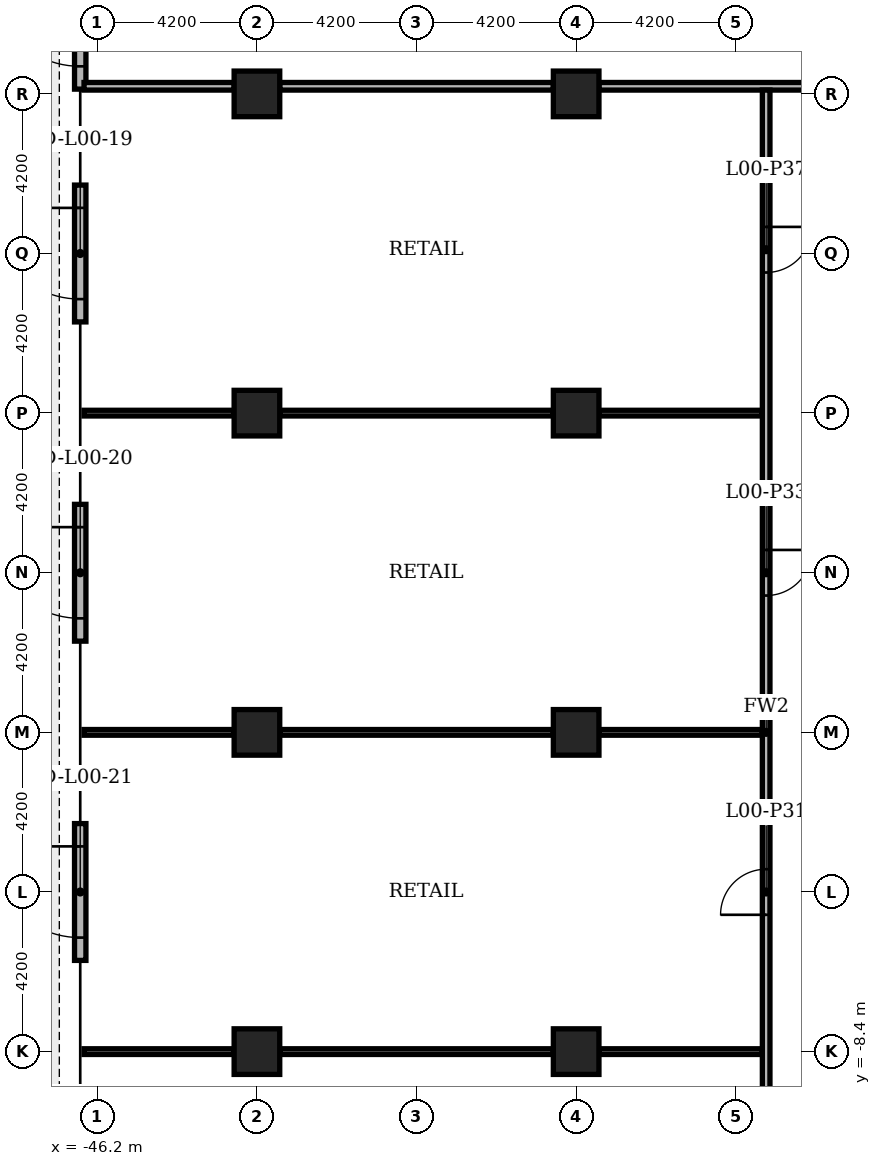
"""IFC4 building model, lengths in metres.
Left out: names, types, materials, properties, quantities, classifications, styles, units other than length and angle.
Written with IfcOpenShell. Run it as: python <this file> out.ifc"""

import sys

from ifc_helpers import new_model, si_unit, direction, frame, frame_2d, origin, origin_2d, place, context, subcontext, project, spatial, rectangle, extrude, element, fill, save


model = new_model("IFC4")
c1 = context("Model", 3, precision=1e-05, world=origin(), true_north=direction((0.0, 1.0)))
c2 = subcontext(c1, "Body", "Model", "MODEL_VIEW")
j1 = project(units=[si_unit("LENGTHUNIT", "METRE"), si_unit("PLANEANGLEUNIT", "RADIAN")], contexts=[c1])
p1 = place(None, origin())
s1 = spatial("IfcSite", under=j1, at=p1, CompositionType="ELEMENT")
p2 = place(p1, origin())
s2 = spatial("IfcBuilding", under=s1, at=p2, CompositionType="ELEMENT")
p3 = place(p2, origin())
s3 = spatial("IfcBuildingStorey", under=s2, at=p3, CompositionType="ELEMENT", Elevation=0.0)
for number, where, z_axis, x_axis in (
    (1, (-33.6, 0.0, 0.0), (0.0, 0.0, 1.0), (1.0, 0.0, 0.0)),
    (2, (-33.6, 8.4, 0.0), (0.0, 0.0, 1.0), (1.0, 0.0, 0.0)),
    (3, (-33.6, 16.8, 0.0), (0.0, 0.0, 1.0), (1.0, 0.0, 0.0)),
    (4, (-33.6, -8.4, 0.0), (0.0, 0.0, 1.0), (1.0, 0.0, 0.0)),
    (5, (-42.0, 0.0, 0.0), (0.0, 0.0, 1.0), (1.0, 0.0, 0.0)),
    (6, (-42.0, 8.4, 0.0), (0.0, 0.0, 1.0), (1.0, 0.0, 0.0)),
    (7, (-42.0, 16.8, 0.0), (0.0, 0.0, 1.0), (1.0, 0.0, 0.0)),
    (8, (-42.0, -8.4, 0.0), (0.0, 0.0, 1.0), (1.0, 0.0, 0.0)),
):
    element("IfcColumn", number, at=place(p3, frame(where, z_axis=z_axis, x_axis=x_axis)), inside=s3, PredefinedType="COLUMN", context=c2, shape_type="SweptSolid", body=[
        extrude(rectangle(XDim=1.2, YDim=1.2, at=origin_2d()), origin(), (0.0, 0.0, 1.0), 7.2),
    ])
p4 = place(p3, frame((-46.65, 20.525, 0.0), z_axis=(0.0, 0.0, 1.0), x_axis=(0.0, -1.0, 0.0)))
e9 = element("IfcWall", 9, at=p4, inside=s3, PredefinedType="STANDARD", context=c2, shape_type="SweptSolid", body=[
    extrude(rectangle(XDim=3.6, YDim=0.3, at=frame_2d((1.8, 0.0))), origin(), (0.0, 0.0, 1.0), 6.78),
])
p5 = place(p4, frame((0.6, 0.0, 0.0)))
e10 = element("IfcOpeningElement", 10, at=p5, cuts=e9, PredefinedType="OPENING", context=c2, shape_type="SweptSolid", body=[
    extrude(rectangle(XDim=2.4, YDim=2.4, at=frame_2d((1.2, 1.2))), frame((0.0, 0.16, 0.0), z_axis=(0.0, -1.0, 0.0), x_axis=(1.0, 0.0, 0.0)), (0.0, 0.0, 1.0), 0.32),
])
p6 = place(p3, frame((-46.65, 14.4, 0.0), z_axis=(0.0, 0.0, 1.0), x_axis=(0.0, -1.0, 0.0)))
e11 = element("IfcWall", 11, at=p6, inside=s3, PredefinedType="STANDARD", context=c2, shape_type="SweptSolid", body=[
    extrude(rectangle(XDim=3.6, YDim=0.3, at=frame_2d((1.8, 0.0))), origin(), (0.0, 0.0, 1.0), 6.78),
])
p7 = place(p6, frame((0.6, 0.0, 0.0)))
e12 = element("IfcOpeningElement", 12, at=p7, cuts=e11, PredefinedType="OPENING", context=c2, shape_type="SweptSolid", body=[
    extrude(rectangle(XDim=2.4, YDim=2.4, at=frame_2d((1.2, 1.2))), frame((0.0, 0.16, 0.0), z_axis=(0.0, -1.0, 0.0), x_axis=(1.0, 0.0, 0.0)), (0.0, 0.0, 1.0), 0.32),
])
p8 = place(p3, frame((-46.65, 6.0, 0.0), z_axis=(0.0, 0.0, 1.0), x_axis=(0.0, -1.0, 0.0)))
e13 = element("IfcWall", 13, at=p8, inside=s3, PredefinedType="STANDARD", context=c2, shape_type="SweptSolid", body=[
    extrude(rectangle(XDim=3.6, YDim=0.3, at=frame_2d((1.8, 0.0))), origin(), (0.0, 0.0, 1.0), 6.78),
])
p9 = place(p8, frame((0.6, 0.0, 0.0)))
e14 = element("IfcOpeningElement", 14, at=p9, cuts=e13, PredefinedType="OPENING", context=c2, shape_type="SweptSolid", body=[
    extrude(rectangle(XDim=2.4, YDim=2.4, at=frame_2d((1.2, 1.2))), frame((0.0, 0.16, 0.0), z_axis=(0.0, -1.0, 0.0), x_axis=(1.0, 0.0, 0.0)), (0.0, 0.0, 1.0), 0.32),
])
p10 = place(p3, frame((-46.65, -2.4, 0.0), z_axis=(0.0, 0.0, 1.0), x_axis=(0.0, -1.0, 0.0)))
e15 = element("IfcWall", 15, at=p10, inside=s3, PredefinedType="STANDARD", context=c2, shape_type="SweptSolid", body=[
    extrude(rectangle(XDim=3.6, YDim=0.3, at=frame_2d((1.8, 0.0))), origin(), (0.0, 0.0, 1.0), 6.78),
])
p11 = place(p10, frame((0.6, 0.0, 0.0)))
e16 = element("IfcOpeningElement", 16, at=p11, cuts=e15, PredefinedType="OPENING", context=c2, shape_type="SweptSolid", body=[
    extrude(rectangle(XDim=2.4, YDim=2.4, at=frame_2d((1.2, 1.2))), frame((0.0, 0.16, 0.0), z_axis=(0.0, -1.0, 0.0), x_axis=(1.0, 0.0, 0.0)), (0.0, 0.0, 1.0), 0.32),
])
p12 = place(p3, frame((-46.55, -8.4, 0.0), z_axis=(0.0, 0.0, 1.0), x_axis=(1.0, 0.0, 0.0)))
e17 = element("IfcWall", 17, at=p12, inside=s3, PredefinedType="PARTITIONING", context=c2, shape_type="SweptSolid", body=[
    extrude(rectangle(XDim=3.95, YDim=0.15, at=frame_2d((1.975, 0.0))), origin(), (0.0, 0.0, 1.0), 6.48),
])
p13 = place(p3, frame((-41.4, -8.4, 0.0), z_axis=(0.0, 0.0, 1.0), x_axis=(1.0, 0.0, 0.0)))
e18 = element("IfcWall", 18, at=p13, inside=s3, PredefinedType="PARTITIONING", context=c2, shape_type="SweptSolid", body=[
    extrude(rectangle(XDim=7.2, YDim=0.15, at=frame_2d((3.6, 0.0))), origin(), (0.0, 0.0, 1.0), 6.48),
])
p14 = place(p3, frame((-33.0, -8.4, 0.0), z_axis=(0.0, 0.0, 1.0), x_axis=(1.0, 0.0, 0.0)))
e19 = element("IfcWall", 19, at=p14, inside=s3, PredefinedType="PARTITIONING", context=c2, shape_type="SweptSolid", body=[
    extrude(rectangle(XDim=4.3, YDim=0.15, at=frame_2d((2.15, 0.0))), origin(), (0.0, 0.0, 1.0), 6.48),
])
p15 = place(p3, frame((-46.55, 0.0, 0.0), z_axis=(0.0, 0.0, 1.0), x_axis=(1.0, 0.0, 0.0)))
e20 = element("IfcWall", 20, at=p15, inside=s3, PredefinedType="PARTITIONING", context=c2, shape_type="SweptSolid", body=[
    extrude(rectangle(XDim=3.95, YDim=0.15, at=frame_2d((1.975, 0.0))), origin(), (0.0, 0.0, 1.0), 6.48),
])
p16 = place(p3, frame((-41.4, 0.0, 0.0), z_axis=(0.0, 0.0, 1.0), x_axis=(1.0, 0.0, 0.0)))
e21 = element("IfcWall", 21, at=p16, inside=s3, PredefinedType="PARTITIONING", context=c2, shape_type="SweptSolid", body=[
    extrude(rectangle(XDim=7.2, YDim=0.15, at=frame_2d((3.6, 0.0))), origin(), (0.0, 0.0, 1.0), 6.48),
])
p17 = place(p3, frame((-33.0, 0.0, 0.0), z_axis=(0.0, 0.0, 1.0), x_axis=(1.0, 0.0, 0.0)))
e22 = element("IfcWall", 22, at=p17, inside=s3, PredefinedType="PARTITIONING", context=c2, shape_type="SweptSolid", body=[
    extrude(rectangle(XDim=4.3, YDim=0.15, at=frame_2d((2.15, 0.0))), origin(), (0.0, 0.0, 1.0), 6.48),
])
p18 = place(p3, frame((-46.55, 8.4, 0.0), z_axis=(0.0, 0.0, 1.0), x_axis=(1.0, 0.0, 0.0)))
e23 = element("IfcWall", 23, at=p18, inside=s3, PredefinedType="PARTITIONING", context=c2, shape_type="SweptSolid", body=[
    extrude(rectangle(XDim=3.95, YDim=0.15, at=frame_2d((1.975, 0.0))), origin(), (0.0, 0.0, 1.0), 6.48),
])
p19 = place(p3, frame((-41.4, 8.4, 0.0), z_axis=(0.0, 0.0, 1.0), x_axis=(1.0, 0.0, 0.0)))
e24 = element("IfcWall", 24, at=p19, inside=s3, PredefinedType="PARTITIONING", context=c2, shape_type="SweptSolid", body=[
    extrude(rectangle(XDim=7.2, YDim=0.15, at=frame_2d((3.6, 0.0))), origin(), (0.0, 0.0, 1.0), 6.48),
])
p20 = place(p3, frame((-33.0, 8.4, 0.0), z_axis=(0.0, 0.0, 1.0), x_axis=(1.0, 0.0, 0.0)))
e25 = element("IfcWall", 25, at=p20, inside=s3, PredefinedType="PARTITIONING", context=c2, shape_type="SweptSolid", body=[
    extrude(rectangle(XDim=4.3, YDim=0.15, at=frame_2d((2.15, 0.0))), origin(), (0.0, 0.0, 1.0), 6.48),
])
p21 = place(p3, frame((-46.55, 17.0, 0.0), z_axis=(0.0, 0.0, 1.0), x_axis=(1.0, 0.0, 0.0)))
e26 = element("IfcWall", 26, at=p21, inside=s3, PredefinedType="PARTITIONING", context=c2, shape_type="SweptSolid", body=[
    extrude(rectangle(XDim=3.95, YDim=0.2, at=frame_2d((1.975, 0.0))), origin(), (0.0, 0.0, 1.0), 6.48),
])
for number, where, z_axis, x_axis in (
    (27, (-41.4, 17.0, 0.0), (0.0, 0.0, 1.0), (1.0, 0.0, 0.0)),
    (28, (-33.0, 17.0, 0.0), (0.0, 0.0, 1.0), (1.0, 0.0, 0.0)),
):
    element("IfcWall", number, at=place(p3, frame(where, z_axis=z_axis, x_axis=x_axis)), inside=s3, PredefinedType="PARTITIONING", context=c2, shape_type="SweptSolid", body=[
        extrude(rectangle(XDim=7.2, YDim=0.2, at=frame_2d((3.6, 0.0))), origin(), (0.0, 0.0, 1.0), 6.48),
    ])
p22 = place(p3, frame((-28.6, -16.9, 0.0), z_axis=(0.0, 0.0, 1.0), x_axis=(0.0, 1.0, 0.0)))
e29 = element("IfcWall", 29, at=p22, inside=s3, PredefinedType="PARTITIONING", context=c2, shape_type="SweptSolid", body=[
    extrude(rectangle(XDim=33.8, YDim=0.2, at=frame_2d((16.9, 0.0))), origin(), (0.0, 0.0, 1.0), 6.48),
])
p23 = place(p22, frame((3.6, 0.0, 0.0)))
e30 = element("IfcOpeningElement", 30, at=p23, cuts=e29, PredefinedType="OPENING", context=c2, shape_type="SweptSolid", body=[
    extrude(rectangle(XDim=1.2, YDim=2.2, at=frame_2d((0.6, 1.1))), frame((0.0, 0.11, 0.0), z_axis=(0.0, -1.0, 0.0), x_axis=(1.0, 0.0, 0.0)), (0.0, 0.0, 1.0), 0.22),
])
p24 = place(p22, frame((12.1, 0.0, 0.0)))
e31 = element("IfcOpeningElement", 31, at=p24, cuts=e29, PredefinedType="OPENING", context=c2, shape_type="SweptSolid", body=[
    extrude(rectangle(XDim=1.2, YDim=2.2, at=frame_2d((0.6, 1.1))), frame((0.0, 0.11, 0.0), z_axis=(0.0, -1.0, 0.0), x_axis=(1.0, 0.0, 0.0)), (0.0, 0.0, 1.0), 0.22),
])
p25 = place(p22, frame((20.5, 0.0, 0.0)))
e32 = element("IfcOpeningElement", 32, at=p25, cuts=e29, PredefinedType="OPENING", context=c2, shape_type="SweptSolid", body=[
    extrude(rectangle(XDim=1.2, YDim=2.2, at=frame_2d((0.6, 1.1))), frame((0.0, 0.11, 0.0), z_axis=(0.0, -1.0, 0.0), x_axis=(1.0, 0.0, 0.0)), (0.0, 0.0, 1.0), 0.22),
])
p26 = place(p22, frame((29.0, 0.0, 0.0)))
e33 = element("IfcOpeningElement", 33, at=p26, cuts=e29, PredefinedType="OPENING", context=c2, shape_type="SweptSolid", body=[
    extrude(rectangle(XDim=1.2, YDim=2.2, at=frame_2d((0.6, 1.1))), frame((0.0, 0.11, 0.0), z_axis=(0.0, -1.0, 0.0), x_axis=(1.0, 0.0, 0.0)), (0.0, 0.0, 1.0), 0.22),
])
p27 = place(p5, frame((2.4, 0.0, 0.0), z_axis=(0.0, 0.0, 1.0), x_axis=(-1.0, 0.0, 0.0)))
e34 = element("IfcDoor", 34, at=p27, inside=s3, OperationType="SINGLE_SWING_LEFT", PredefinedType="DOOR", context=c2, shape_type="SweptSolid", body=[
    extrude(rectangle(XDim=2.4, YDim=2.4, at=frame_2d((1.2, 1.2))), frame((0.0, 0.025, 0.0), z_axis=(0.0, -1.0, 0.0), x_axis=(1.0, 0.0, 0.0)), (0.0, 0.0, 1.0), 0.05),
])
fill(e10, e34)
p28 = place(p7, frame((2.4, 0.0, 0.0), z_axis=(0.0, 0.0, 1.0), x_axis=(-1.0, 0.0, 0.0)))
e35 = element("IfcDoor", 35, at=p28, inside=s3, OperationType="DOUBLE_DOOR_SINGLE_SWING", PredefinedType="DOOR", context=c2, shape_type="SweptSolid", body=[
    extrude(rectangle(XDim=2.4, YDim=2.4, at=frame_2d((1.2, 1.2))), frame((0.0, 0.025, 0.0), z_axis=(0.0, -1.0, 0.0), x_axis=(1.0, 0.0, 0.0)), (0.0, 0.0, 1.0), 0.05),
])
fill(e12, e35)
p29 = place(p9, frame((2.4, 0.0, 0.0), z_axis=(0.0, 0.0, 1.0), x_axis=(-1.0, 0.0, 0.0)))
e36 = element("IfcDoor", 36, at=p29, inside=s3, OperationType="DOUBLE_DOOR_SINGLE_SWING", PredefinedType="DOOR", context=c2, shape_type="SweptSolid", body=[
    extrude(rectangle(XDim=2.4, YDim=2.4, at=frame_2d((1.2, 1.2))), frame((0.0, 0.025, 0.0), z_axis=(0.0, -1.0, 0.0), x_axis=(1.0, 0.0, 0.0)), (0.0, 0.0, 1.0), 0.05),
])
fill(e14, e36)
p30 = place(p11, frame((2.4, 0.0, 0.0), z_axis=(0.0, 0.0, 1.0), x_axis=(-1.0, 0.0, 0.0)))
e37 = element("IfcDoor", 37, at=p30, inside=s3, OperationType="DOUBLE_DOOR_SINGLE_SWING", PredefinedType="DOOR", context=c2, shape_type="SweptSolid", body=[
    extrude(rectangle(XDim=2.4, YDim=2.4, at=frame_2d((1.2, 1.2))), frame((0.0, 0.025, 0.0), z_axis=(0.0, -1.0, 0.0), x_axis=(1.0, 0.0, 0.0)), (0.0, 0.0, 1.0), 0.05),
])
fill(e16, e37)
p31 = place(p24, origin())
e38 = element("IfcDoor", 38, at=p31, inside=s3, OperationType="SINGLE_SWING_LEFT", PredefinedType="DOOR", context=c2, shape_type="SweptSolid", body=[
    extrude(rectangle(XDim=1.2, YDim=2.2, at=frame_2d((0.6, 1.1))), frame((0.0, 0.025, 0.0), z_axis=(0.0, -1.0, 0.0), x_axis=(1.0, 0.0, 0.0)), (0.0, 0.0, 1.0), 0.05),
])
fill(e31, e38)
p32 = place(p25, origin())
e39 = element("IfcDoor", 39, at=p32, inside=s3, OperationType="SINGLE_SWING_RIGHT", PredefinedType="DOOR", context=c2, shape_type="SweptSolid", body=[
    extrude(rectangle(XDim=1.2, YDim=2.2, at=frame_2d((0.6, 1.1))), frame((0.0, 0.025, 0.0), z_axis=(0.0, -1.0, 0.0), x_axis=(1.0, 0.0, 0.0)), (0.0, 0.0, 1.0), 0.05),
])
fill(e32, e39)
p33 = place(p26, origin())
e40 = element("IfcDoor", 40, at=p33, inside=s3, OperationType="SINGLE_SWING_RIGHT", PredefinedType="DOOR", context=c2, shape_type="SweptSolid", body=[
    extrude(rectangle(XDim=1.2, YDim=2.2, at=frame_2d((0.6, 1.1))), frame((0.0, 0.025, 0.0), z_axis=(0.0, -1.0, 0.0), x_axis=(1.0, 0.0, 0.0)), (0.0, 0.0, 1.0), 0.05),
])
fill(e33, e40)
save(model, sys.argv[1])
